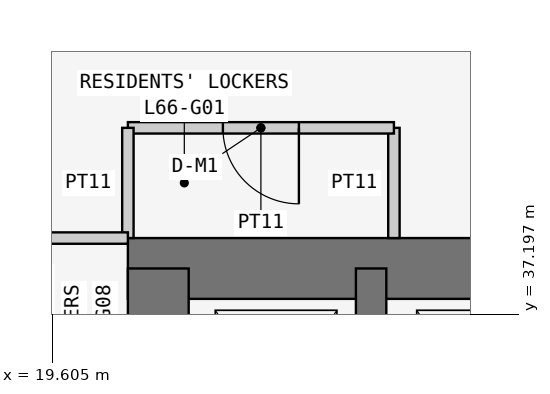
"""IFC4 building model, lengths in metres.
Left out: names, types, materials, properties, quantities, classifications, styles, units other than length and angle.
Written with IfcOpenShell. Run it as: python <this file> out.ifc"""

import sys

from ifc_helpers import new_model, si_unit, direction, frame, frame_2d, origin, place, context, subcontext, project, spatial, rectangle, extrude, element, fill, save


model = new_model("IFC4")
c1 = context("Model", 3, precision=1e-05, world=origin(), true_north=direction((0.0, 1.0)))
c2 = subcontext(c1, "Body", "Model", "MODEL_VIEW")
j1 = project(units=[si_unit("LENGTHUNIT", "METRE"), si_unit("PLANEANGLEUNIT", "RADIAN")], contexts=[c1])
p1 = place(None, origin())
s1 = spatial("IfcSite", under=j1, at=p1, CompositionType="ELEMENT")
p2 = place(p1, origin())
s2 = spatial("IfcBuilding", under=s1, at=p2, CompositionType="ELEMENT")
p3 = place(p2, frame((0.0, 0.0, 254.1)))
s3 = spatial("IfcBuildingStorey", under=s2, at=p3, CompositionType="ELEMENT", Elevation=254.1)
p4 = place(p3, frame((37.8, 37.8, 0.0), z_axis=(0.0, 0.0, 1.0), x_axis=(-1.0, 0.0, 0.0)))
e1 = element("IfcWall", 1, at=p4, inside=s3, PredefinedType="SHEAR", context=c2, shape_type="SweptSolid", body=[
    extrude(rectangle(XDim=17.2, YDim=0.8, at=frame_2d((8.6, 0.0))), origin(), (0.0, 0.0, 1.0), 3.6),
])
p5 = place(p3, frame((21.0, 37.8, 0.0), z_axis=(0.0, 0.0, 1.0), x_axis=(0.0, -1.0, 0.0)))
e2 = element("IfcWall", 2, at=p5, inside=s3, PredefinedType="SHEAR", context=c2, shape_type="SweptSolid", body=[
    extrude(rectangle(XDim=17.2, YDim=0.8, at=frame_2d((8.6, 0.0))), origin(), (0.0, 0.0, 1.0), 3.6),
])
p6 = place(p5, frame((5.4, 0.0, 0.0)))
e3 = element("IfcOpeningElement", 3, at=p6, cuts=e2, PredefinedType="OPENING", context=c2, shape_type="SweptSolid", body=[
    extrude(rectangle(XDim=1.2, YDim=2.1, at=frame_2d((0.6, 1.05))), frame((0.0, 0.41, 0.0), z_axis=(0.0, -1.0, 0.0), x_axis=(1.0, 0.0, 0.0)), (0.0, 0.0, 1.0), 0.82),
])
p7 = place(p3, frame((23.8, 34.6, 0.0), z_axis=(0.0, 0.0, 1.0), x_axis=(0.0, 1.0, 0.0)))
e4 = element("IfcWall", 4, at=p7, inside=s3, PredefinedType="SHEAR", context=c2, shape_type="SweptSolid", body=[
    extrude(rectangle(XDim=3.2, YDim=0.4, at=frame_2d((1.6, 0.0))), origin(), (0.0, 0.0, 1.0), 3.6),
])
p8 = place(p3, frame((24.1, 38.2, 0.0), z_axis=(0.0, 0.0, 1.0), x_axis=(0.0, 1.0, 0.0)))
e5 = element("IfcWall", 5, at=p8, inside=s3, PredefinedType="PARTITIONING", context=c2, shape_type="SweptSolid", body=[
    extrude(rectangle(XDim=1.45, YDim=0.15, at=frame_2d((0.725, 0.0))), origin(), (0.0, 0.0, 1.0), 3.45),
])
p9 = place(p3, frame((24.1, 39.65, 0.0), z_axis=(0.0, 0.0, 1.0), x_axis=(-1.0, 0.0, 0.0)))
e6 = element("IfcWall", 6, at=p9, inside=s3, PredefinedType="PARTITIONING", context=c2, shape_type="SweptSolid", body=[
    extrude(rectangle(XDim=3.5, YDim=0.15, at=frame_2d((1.75, 0.0))), origin(), (0.0, 0.0, 1.0), 3.45),
])
p10 = place(p9, frame((1.25, 0.0, 0.0)))
e7 = element("IfcOpeningElement", 7, at=p10, cuts=e6, PredefinedType="OPENING", context=c2, shape_type="SweptSolid", body=[
    extrude(rectangle(XDim=1.0, YDim=2.1, at=frame_2d((0.5, 1.05))), frame((0.0, 0.085, 0.0), z_axis=(0.0, -1.0, 0.0), x_axis=(1.0, 0.0, 0.0)), (0.0, 0.0, 1.0), 0.17),
])
p11 = place(p3, frame((20.6, 39.65, 0.0), z_axis=(0.0, 0.0, 1.0), x_axis=(0.0, -1.0, 0.0)))
e8 = element("IfcWall", 8, at=p11, inside=s3, PredefinedType="PARTITIONING", context=c2, shape_type="SweptSolid", body=[
    extrude(rectangle(XDim=1.45, YDim=0.15, at=frame_2d((0.725, 0.0))), origin(), (0.0, 0.0, 1.0), 3.45),
])
p12 = place(p3, frame((20.6, 38.2, 0.0), z_axis=(0.0, 0.0, 1.0), x_axis=(-1.0, 0.0, 0.0)))
e9 = element("IfcWall", 9, at=p12, inside=s3, PredefinedType="PARTITIONING", context=c2, shape_type="SweptSolid", body=[
    extrude(rectangle(XDim=2.4, YDim=0.15, at=frame_2d((1.2, 0.0))), origin(), (0.0, 0.0, 1.0), 3.45),
])
p13 = place(p10, origin())
e10 = element("IfcDoor", 10, at=p13, inside=s3, OperationType="SINGLE_SWING_LEFT", PredefinedType="DOOR", context=c2, shape_type="SweptSolid", body=[
    extrude(rectangle(XDim=1.0, YDim=2.1, at=frame_2d((0.5, 1.05))), frame((0.0, 0.025, 0.0), z_axis=(0.0, -1.0, 0.0), x_axis=(1.0, 0.0, 0.0)), (0.0, 0.0, 1.0), 0.05),
])
fill(e7, e10)
save(model, sys.argv[1])
